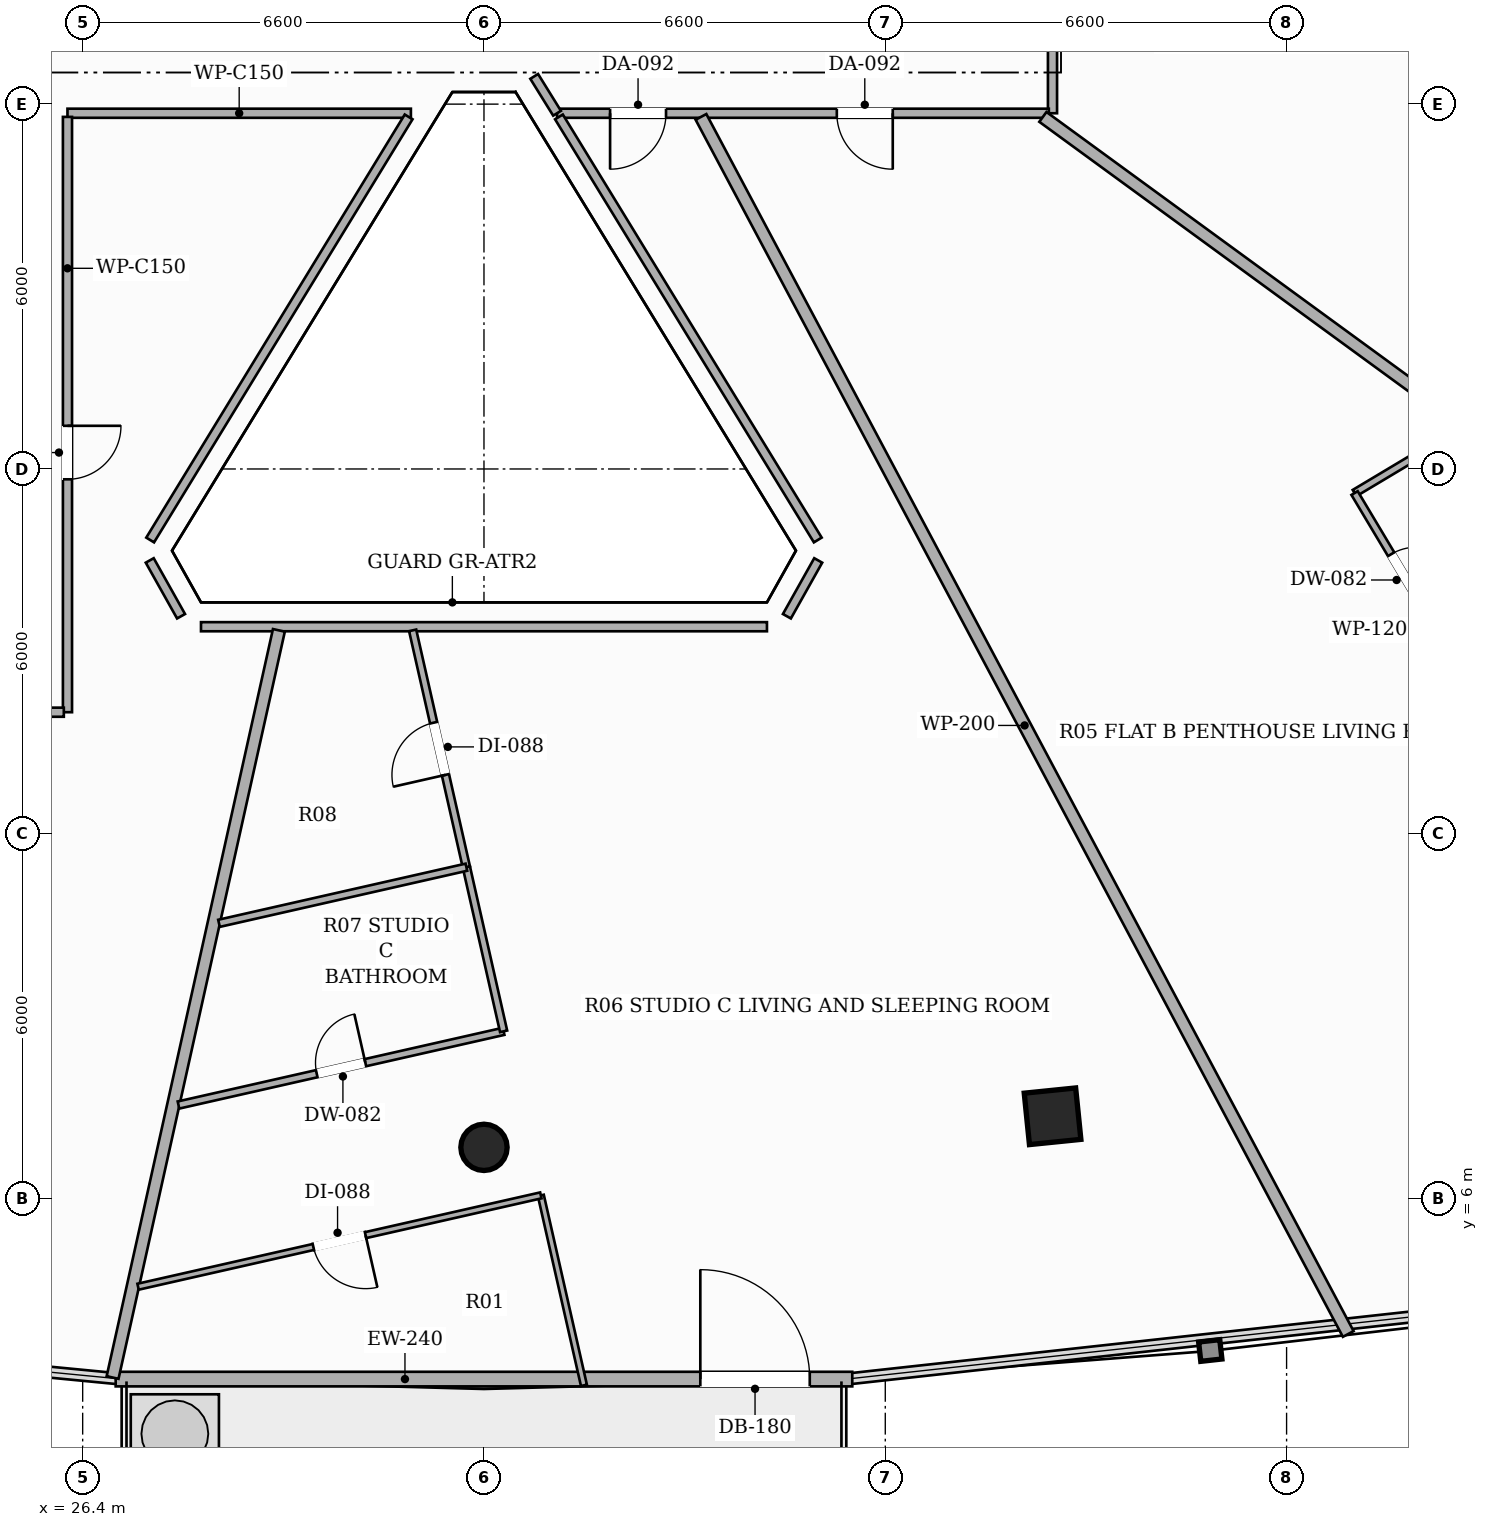
"""IFC4 building model, lengths in metres.
Left out: names, types, materials, properties, quantities, classifications, styles, units other than length and angle.
Written with IfcOpenShell. Run it as: python <this file> out.ifc"""

import sys

from ifc_helpers import new_model, si_unit, direction, frame, frame_2d, origin, origin_2d, place, context, subcontext, project, spatial, rectangle, hollow_rectangle, hollow_circle, extrude, element, fill, save


model = new_model("IFC4")
c1 = context("Model", 3, precision=1e-05, world=origin(), true_north=direction((0.0, 1.0)))
c2 = subcontext(c1, "Body", "Model", "MODEL_VIEW")
j1 = project(units=[si_unit("LENGTHUNIT", "METRE"), si_unit("PLANEANGLEUNIT", "RADIAN")], contexts=[c1])
p1 = place(None, origin())
s1 = spatial("IfcSite", under=j1, at=p1, CompositionType="ELEMENT")
p2 = place(p1, origin())
s2 = spatial("IfcBuilding", under=s1, at=p2, CompositionType="ELEMENT")
p3 = place(p2, frame((0.0, 0.0, 116.6)))
s3 = spatial("IfcBuildingStorey", under=s2, at=p3, CompositionType="ELEMENT", Elevation=116.6)
p4 = place(p3, frame((33.0, 6.844, 0.0), z_axis=(0.0, 0.0, 1.0), x_axis=(1.0, 0.0, 0.0)))
e1 = element("IfcColumn", 1, at=p4, inside=s3, PredefinedType="COLUMN", context=c2, shape_type="SweptSolid", body=[
    extrude(hollow_circle(Radius=0.381, WallThickness=0.022, at=origin_2d()), origin(), (0.0, 0.0, 1.0), 3.3),
])
p5 = place(p3, frame((42.351, 7.355, 0.0), z_axis=(0.0, 0.0, 1.0), x_axis=(0.994880708829, 0.101056297183, 0.0)))
e2 = element("IfcColumn", 2, at=p5, inside=s3, PredefinedType="COLUMN", context=c2, shape_type="SweptSolid", body=[
    extrude(hollow_rectangle(XDim=0.85, YDim=0.85, WallThickness=0.028, at=origin_2d()), origin(), (0.0, 0.0, 1.0), 3.3),
])
p6 = place(p3, frame((26.943, 3.033, 0.0), z_axis=(0.0, 0.0, 1.0), x_axis=(1.0, 0.0, 0.0)))
e3 = element("IfcWall", 3, at=p6, inside=s3, PredefinedType="SOLIDWALL", context=c2, shape_type="SweptSolid", body=[
    extrude(rectangle(XDim=12.114, YDim=0.24, at=frame_2d((6.057, 0.0))), origin(), (0.0, 0.0, 1.0), 2.624),
])
p7 = place(p6, frame((9.615, 0.0, 0.0)))
e4 = element("IfcOpeningElement", 4, at=p7, cuts=e3, PredefinedType="OPENING", context=c2, shape_type="SweptSolid", body=[
    extrude(rectangle(XDim=1.8, YDim=2.2, at=frame_2d((0.9, 1.1))), frame((0.0, 0.13, 0.0), z_axis=(0.0, -1.0, 0.0), x_axis=(1.0, 0.0, 0.0)), (0.0, 0.0, 1.0), 0.26),
])
p8 = place(p3, frame((31.798, 23.85, 0.0), z_axis=(0.0, 0.0, 1.0), x_axis=(-1.0, 0.0, 0.0)))
e5 = element("IfcWall", 5, at=p8, inside=s3, PredefinedType="PARTITIONING", context=c2, shape_type="SweptSolid", body=[
    extrude(rectangle(XDim=5.648, YDim=0.15, at=frame_2d((2.824, 0.0))), origin(), (0.0, 0.0, 1.0), 2.721),
])
p9 = place(p3, frame((26.15, 23.79, 0.0), z_axis=(0.0, 0.0, 1.0), x_axis=(0.0, -1.0, 0.0)))
e6 = element("IfcWall", 6, at=p9, inside=s3, PredefinedType="PARTITIONING", context=c2, shape_type="SweptSolid", body=[
    extrude(rectangle(XDim=9.79, YDim=0.15, at=frame_2d((4.895, 0.0))), origin(), (0.0, 0.0, 1.0), 2.721),
])
p10 = place(p9, frame((5.08, 0.0, 0.0)))
e7 = element("IfcOpeningElement", 7, at=p10, cuts=e6, PredefinedType="OPENING", context=c2, shape_type="SweptSolid", body=[
    extrude(rectangle(XDim=0.88, YDim=2.1, at=frame_2d((0.44, 1.05))), frame((0.0, 0.085, 0.0), z_axis=(0.0, -1.0, 0.0), x_axis=(1.0, 0.0, 0.0)), (0.0, 0.0, 1.0), 0.17),
])
p11 = place(p3, frame((26.09, 14.0, 0.0), z_axis=(0.0, 0.0, 1.0), x_axis=(-1.0, 0.0, 0.0)))
e8 = element("IfcWall", 8, at=p11, inside=s3, PredefinedType="PARTITIONING", context=c2, shape_type="SweptSolid", body=[
    extrude(rectangle(XDim=2.59, YDim=0.15, at=frame_2d((1.295, 0.0))), origin(), (0.0, 0.0, 1.0), 2.721),
])
p12 = place(p3, frame((42.35, 28.34, 0.0), z_axis=(0.0, 0.0, 1.0), x_axis=(0.0, -1.0, 0.0)))
e9 = element("IfcWall", 9, at=p12, inside=s3, PredefinedType="PARTITIONING", context=c2, shape_type="SweptSolid", body=[
    extrude(rectangle(XDim=4.49, YDim=0.15, at=frame_2d((2.245, 0.0))), origin(), (0.0, 0.0, 1.0), 2.721),
])
p13 = place(p12, frame((1.805, 0.0, 0.0)))
e10 = element("IfcOpeningElement", 10, at=p13, cuts=e9, PredefinedType="OPENING", context=c2, shape_type="SweptSolid", body=[
    extrude(rectangle(XDim=0.88, YDim=2.1, at=frame_2d((0.44, 1.05))), frame((0.0, 0.085, 0.0), z_axis=(0.0, -1.0, 0.0), x_axis=(1.0, 0.0, 0.0)), (0.0, 0.0, 1.0), 0.17),
])
p14 = place(p3, frame((42.29, 23.85, 0.0), z_axis=(0.0, 0.0, 1.0), x_axis=(-1.0, 0.0, 0.0)))
e11 = element("IfcWall", 11, at=p14, inside=s3, PredefinedType="PARTITIONING", context=c2, shape_type="SweptSolid", body=[
    extrude(rectangle(XDim=8.088, YDim=0.15, at=frame_2d((4.044, 0.0))), origin(), (0.0, 0.0, 1.0), 2.492),
])
p15 = place(p14, frame((2.567, 0.0, 0.0)))
e12 = element("IfcOpeningElement", 12, at=p15, cuts=e11, PredefinedType="OPENING", context=c2, shape_type="SweptSolid", body=[
    extrude(rectangle(XDim=0.92, YDim=2.15, at=frame_2d((0.46, 1.075))), frame((0.0, 0.085, 0.0), z_axis=(0.0, -1.0, 0.0), x_axis=(1.0, 0.0, 0.0)), (0.0, 0.0, 1.0), 0.17),
])
p16 = place(p14, frame((6.296, 0.0, 0.0)))
e13 = element("IfcOpeningElement", 13, at=p16, cuts=e11, PredefinedType="OPENING", context=c2, shape_type="SweptSolid", body=[
    extrude(rectangle(XDim=0.92, YDim=2.15, at=frame_2d((0.46, 1.075))), frame((0.0, 0.085, 0.0), z_axis=(0.0, -1.0, 0.0), x_axis=(1.0, 0.0, 0.0)), (0.0, 0.0, 1.0), 0.17),
])
p17 = place(p3, frame((34.202, 23.85, 0.0), z_axis=(0.0, 0.0, 1.0), x_axis=(-0.527226500772, 0.849724788907, 0.0)))
e14 = element("IfcWall", 14, at=p17, inside=s3, PredefinedType="PARTITIONING", context=c2, shape_type="SweptSolid", body=[
    extrude(rectangle(XDim=0.713, YDim=0.15, at=frame_2d((0.356, 0.0))), origin(), (0.0, 0.0, 1.0), 3.06),
])
p18 = place(p3, frame((34.233, 23.79, 0.0), z_axis=(0.0, 0.0, 1.0), x_axis=(0.521893040745, -0.853010934292, 0.0)))
e15 = element("IfcWall", 15, at=p18, inside=s3, PredefinedType="PARTITIONING", context=c2, shape_type="SweptSolid", body=[
    extrude(rectangle(XDim=8.157, YDim=0.15, at=frame_2d((4.079, 0.0))), origin(), (0.0, 0.0, 1.0), 2.721),
])
p19 = place(p3, frame((38.497, 16.496, 0.0), z_axis=(0.0, 0.0, 1.0), x_axis=(-0.489281087794, -0.872126147485, 0.0)))
e16 = element("IfcWall", 16, at=p19, inside=s3, PredefinedType="PARTITIONING", context=c2, shape_type="SweptSolid", body=[
    extrude(rectangle(XDim=1.053, YDim=0.15, at=frame_2d((0.526, 0.0))), origin(), (0.0, 0.0, 1.0), 3.06),
])
p20 = place(p3, frame((37.654, 15.406, 0.0), z_axis=(0.0, 0.0, 1.0), x_axis=(-1.0, 0.0, 0.0)))
e17 = element("IfcWall", 17, at=p20, inside=s3, PredefinedType="PARTITIONING", context=c2, shape_type="SweptSolid", body=[
    extrude(rectangle(XDim=9.308, YDim=0.15, at=frame_2d((4.654, 0.0))), origin(), (0.0, 0.0, 1.0), 2.721),
])
p21 = place(p3, frame((28.018, 15.578, 0.0), z_axis=(0.0, 0.0, 1.0), x_axis=(-0.489281087794, 0.872126147485, 0.0)))
e18 = element("IfcWall", 18, at=p21, inside=s3, PredefinedType="PARTITIONING", context=c2, shape_type="SweptSolid", body=[
    extrude(rectangle(XDim=1.053, YDim=0.15, at=frame_2d((0.526, 0.0))), origin(), (0.0, 0.0, 1.0), 3.06),
])
p22 = place(p3, frame((27.51, 16.832, 0.0), z_axis=(0.0, 0.0, 1.0), x_axis=(0.521348270591, 0.853343999072, 0.0)))
e19 = element("IfcWall", 19, at=p22, inside=s3, PredefinedType="PARTITIONING", context=c2, shape_type="SweptSolid", body=[
    extrude(rectangle(XDim=8.154, YDim=0.15, at=frame_2d((4.077, 0.0))), origin(), (0.0, 0.0, 1.0), 2.721),
])
p23 = place(p3, frame((47.214, 3.775, 0.0), z_axis=(0.0, 0.0, 1.0), x_axis=(-0.469567249912, 0.88289670846, 0.0)))
e20 = element("IfcWall", 20, at=p23, inside=s3, PredefinedType="PARTITIONING", context=c2, shape_type="SweptSolid", body=[
    extrude(rectangle(XDim=22.67, YDim=0.2, at=frame_2d((11.335, 0.0))), origin(), (0.0, 0.0, 1.0), 2.413),
])
p24 = place(p3, frame((42.192, 23.79, 0.0), z_axis=(0.0, 0.0, 1.0), x_axis=(0.807710254014, -0.589579634621, 0.0)))
e21 = element("IfcWall", 21, at=p24, inside=s3, PredefinedType="PARTITIONING", context=c2, shape_type="SweptSolid", body=[
    extrude(rectangle(XDim=18.691, YDim=0.2, at=frame_2d((9.346, 0.0))), origin(), (0.0, 0.0, 1.0), 2.413),
])
p25 = place(p3, frame((26.892, 3.059, 0.0), z_axis=(0.0, 0.0, 1.0), x_axis=(0.217267240277, 0.97611215867, 0.0)))
e22 = element("IfcWall", 22, at=p25, inside=s3, PredefinedType="PARTITIONING", context=c2, shape_type="SweptSolid", body=[
    extrude(rectangle(XDim=12.588, YDim=0.2, at=frame_2d((6.294, 0.0))), origin(), (0.0, 0.0, 1.0), 2.413),
])
p26 = place(p3, frame((49.08, 18.657, 0.0), z_axis=(0.0, 0.0, 1.0), x_axis=(-0.858394155401, -0.51299071529, 0.0)))
e23 = element("IfcWall", 23, at=p26, inside=s3, PredefinedType="PARTITIONING", context=c2, shape_type="SweptSolid", body=[
    extrude(rectangle(XDim=2.053, YDim=0.12, at=frame_2d((1.026, 0.0))), origin(), (0.0, 0.0, 1.0), 2.721),
])
p27 = place(p3, frame((47.318, 17.604, 0.0), z_axis=(0.0, 0.0, 1.0), x_axis=(0.51313361254, -0.858308741469, 0.0)))
e24 = element("IfcWall", 24, at=p27, inside=s3, PredefinedType="PARTITIONING", context=c2, shape_type="SweptSolid", body=[
    extrude(rectangle(XDim=3.165, YDim=0.12, at=frame_2d((1.582, 0.0))), origin(), (0.0, 0.0, 1.0), 2.492),
])
p28 = place(p27, frame((1.172, 0.0, 0.0)))
e25 = element("IfcOpeningElement", 25, at=p28, cuts=e24, PredefinedType="OPENING", context=c2, shape_type="SweptSolid", body=[
    extrude(rectangle(XDim=0.82, YDim=2.1, at=frame_2d((0.41, 1.05))), frame((0.0, 0.07, 0.0), z_axis=(0.0, -1.0, 0.0), x_axis=(1.0, 0.0, 0.0)), (0.0, 0.0, 1.0), 0.14),
])
p29 = place(p3, frame((27.976, 7.54, 0.0), z_axis=(0.0, 0.0, 1.0), x_axis=(0.975262605336, 0.221049430295, 0.0)))
e26 = element("IfcWall", 26, at=p29, inside=s3, PredefinedType="PARTITIONING", context=c2, shape_type="SweptSolid", body=[
    extrude(rectangle(XDim=5.483, YDim=0.12, at=frame_2d((2.741, 0.0))), origin(), (0.0, 0.0, 1.0), 2.413),
])
p30 = place(p29, frame((2.331, 0.0, 0.0)))
e27 = element("IfcOpeningElement", 27, at=p30, cuts=e26, PredefinedType="OPENING", context=c2, shape_type="SweptSolid", body=[
    extrude(rectangle(XDim=0.82, YDim=2.1, at=frame_2d((0.41, 1.05))), frame((0.0, 0.07, 0.0), z_axis=(0.0, -1.0, 0.0), x_axis=(1.0, 0.0, 0.0)), (0.0, 0.0, 1.0), 0.14),
])
p31 = place(p3, frame((33.323, 8.752, 0.0), z_axis=(0.0, 0.0, 1.0), x_axis=(-0.221159716637, 0.975237601683, 0.0)))
e28 = element("IfcWall", 28, at=p31, inside=s3, PredefinedType="PARTITIONING", context=c2, shape_type="SweptSolid", body=[
    extrude(rectangle(XDim=2.768, YDim=0.12, at=frame_2d((1.384, 0.0))), origin(), (0.0, 0.0, 1.0), 2.721),
])
p32 = place(p3, frame((32.711, 11.451, 0.0), z_axis=(0.0, 0.0, 1.0), x_axis=(-0.221335761288, 0.975197662413, 0.0)))
e29 = element("IfcWall", 29, at=p32, inside=s3, PredefinedType="PARTITIONING", context=c2, shape_type="SweptSolid", body=[
    extrude(rectangle(XDim=3.994, YDim=0.12, at=frame_2d((1.997, 0.0))), origin(), (0.0, 0.0, 1.0), 2.721),
])
p33 = place(p32, frame((1.557, 0.0, 0.0)))
e30 = element("IfcOpeningElement", 30, at=p33, cuts=e29, PredefinedType="OPENING", context=c2, shape_type="SweptSolid", body=[
    extrude(rectangle(XDim=0.88, YDim=2.1, at=frame_2d((0.44, 1.05))), frame((0.0, 0.07, 0.0), z_axis=(0.0, -1.0, 0.0), x_axis=(1.0, 0.0, 0.0)), (0.0, 0.0, 1.0), 0.14),
])
p34 = place(p3, frame((34.644, 2.93, 0.0), z_axis=(0.0, 0.0, 1.0), x_axis=(-0.22131804383, 0.975201683487, 0.0)))
e31 = element("IfcWall", 31, at=p34, inside=s3, PredefinedType="PARTITIONING", context=c2, shape_type="SweptSolid", body=[
    extrude(rectangle(XDim=3.203, YDim=0.1, at=frame_2d((1.602, 0.0))), origin(), (0.0, 0.0, 1.0), 3.06),
])
p35 = place(p3, frame((33.935, 6.054, 0.0), z_axis=(0.0, 0.0, 1.0), x_axis=(-0.975244308244, -0.221130140952, 0.0)))
e32 = element("IfcWall", 32, at=p35, inside=s3, PredefinedType="PARTITIONING", context=c2, shape_type="SweptSolid", body=[
    extrude(rectangle(XDim=6.792, YDim=0.1, at=frame_2d((3.396, 0.0))), origin(), (0.0, 0.0, 1.0), 3.06),
])
p36 = place(p35, frame((2.956, 0.0, 0.0)))
e33 = element("IfcOpeningElement", 33, at=p36, cuts=e32, PredefinedType="OPENING", context=c2, shape_type="SweptSolid", body=[
    extrude(rectangle(XDim=0.88, YDim=2.1, at=frame_2d((0.44, 1.05))), frame((0.0, 0.06, 0.0), z_axis=(0.0, -1.0, 0.0), x_axis=(1.0, 0.0, 0.0)), (0.0, 0.0, 1.0), 0.12),
])
p37 = place(p3, frame((28.642, 10.528, 0.0), z_axis=(0.0, 0.0, 1.0), x_axis=(0.975230479555, 0.221191120408, 0.0)))
e34 = element("IfcWall", 34, at=p37, inside=s3, PredefinedType="PARTITIONING", context=c2, shape_type="SweptSolid", body=[
    extrude(rectangle(XDim=4.172, YDim=0.12, at=frame_2d((2.086, 0.0))), origin(), (0.0, 0.0, 1.0), 2.721),
])
p38 = place(p7, origin())
e35 = element("IfcDoor", 35, at=p38, inside=s3, OperationType="SINGLE_SWING_LEFT", PredefinedType="DOOR", context=c2, shape_type="SweptSolid", body=[
    extrude(rectangle(XDim=1.8, YDim=2.2, at=frame_2d((0.9, 1.1))), frame((0.0, 0.025, 0.0), z_axis=(0.0, -1.0, 0.0), x_axis=(1.0, 0.0, 0.0)), (0.0, 0.0, 1.0), 0.05),
])
fill(e4, e35)
p39 = place(p15, origin())
e36 = element("IfcDoor", 36, at=p39, inside=s3, OperationType="SINGLE_SWING_LEFT", PredefinedType="DOOR", context=c2, shape_type="SweptSolid", body=[
    extrude(rectangle(XDim=0.92, YDim=2.15, at=frame_2d((0.46, 1.075))), frame((0.0, 0.025, 0.0), z_axis=(0.0, -1.0, 0.0), x_axis=(1.0, 0.0, 0.0)), (0.0, 0.0, 1.0), 0.05),
])
fill(e12, e36)
p40 = place(p28, origin())
e37 = element("IfcDoor", 37, at=p40, inside=s3, OperationType="SINGLE_SWING_RIGHT", PredefinedType="DOOR", context=c2, shape_type="SweptSolid", body=[
    extrude(rectangle(XDim=0.82, YDim=2.1, at=frame_2d((0.41, 1.05))), frame((0.0, 0.025, 0.0), z_axis=(0.0, -1.0, 0.0), x_axis=(1.0, 0.0, 0.0)), (0.0, 0.0, 1.0), 0.05),
])
fill(e25, e37)
p41 = place(p16, origin())
e38 = element("IfcDoor", 38, at=p41, inside=s3, OperationType="SINGLE_SWING_RIGHT", PredefinedType="DOOR", context=c2, shape_type="SweptSolid", body=[
    extrude(rectangle(XDim=0.92, YDim=2.15, at=frame_2d((0.46, 1.075))), frame((0.0, 0.025, 0.0), z_axis=(0.0, -1.0, 0.0), x_axis=(1.0, 0.0, 0.0)), (0.0, 0.0, 1.0), 0.05),
])
fill(e13, e38)
p42 = place(p30, origin())
e39 = element("IfcDoor", 39, at=p42, inside=s3, OperationType="SINGLE_SWING_RIGHT", PredefinedType="DOOR", context=c2, shape_type="SweptSolid", body=[
    extrude(rectangle(XDim=0.82, YDim=2.1, at=frame_2d((0.41, 1.05))), frame((0.0, 0.025, 0.0), z_axis=(0.0, -1.0, 0.0), x_axis=(1.0, 0.0, 0.0)), (0.0, 0.0, 1.0), 0.05),
])
fill(e27, e39)
p43 = place(p33, origin())
e40 = element("IfcDoor", 40, at=p43, inside=s3, OperationType="SINGLE_SWING_LEFT", PredefinedType="DOOR", context=c2, shape_type="SweptSolid", body=[
    extrude(rectangle(XDim=0.88, YDim=2.1, at=frame_2d((0.44, 1.05))), frame((0.0, 0.025, 0.0), z_axis=(0.0, -1.0, 0.0), x_axis=(1.0, 0.0, 0.0)), (0.0, 0.0, 1.0), 0.05),
])
fill(e30, e40)
p44 = place(p36, origin())
e41 = element("IfcDoor", 41, at=p44, inside=s3, OperationType="SINGLE_SWING_LEFT", PredefinedType="DOOR", context=c2, shape_type="SweptSolid", body=[
    extrude(rectangle(XDim=0.88, YDim=2.1, at=frame_2d((0.44, 1.05))), frame((0.0, 0.025, 0.0), z_axis=(0.0, -1.0, 0.0), x_axis=(1.0, 0.0, 0.0)), (0.0, 0.0, 1.0), 0.05),
])
fill(e33, e41)
p45 = place(p10, origin())
e42 = element("IfcDoor", 42, at=p45, inside=s3, OperationType="SINGLE_SWING_LEFT", PredefinedType="DOOR", context=c2, shape_type="SweptSolid", body=[
    extrude(rectangle(XDim=0.88, YDim=2.1, at=frame_2d((0.44, 1.05))), frame((0.0, 0.025, 0.0), z_axis=(0.0, -1.0, 0.0), x_axis=(1.0, 0.0, 0.0)), (0.0, 0.0, 1.0), 0.05),
])
fill(e7, e42)
save(model, sys.argv[1])
